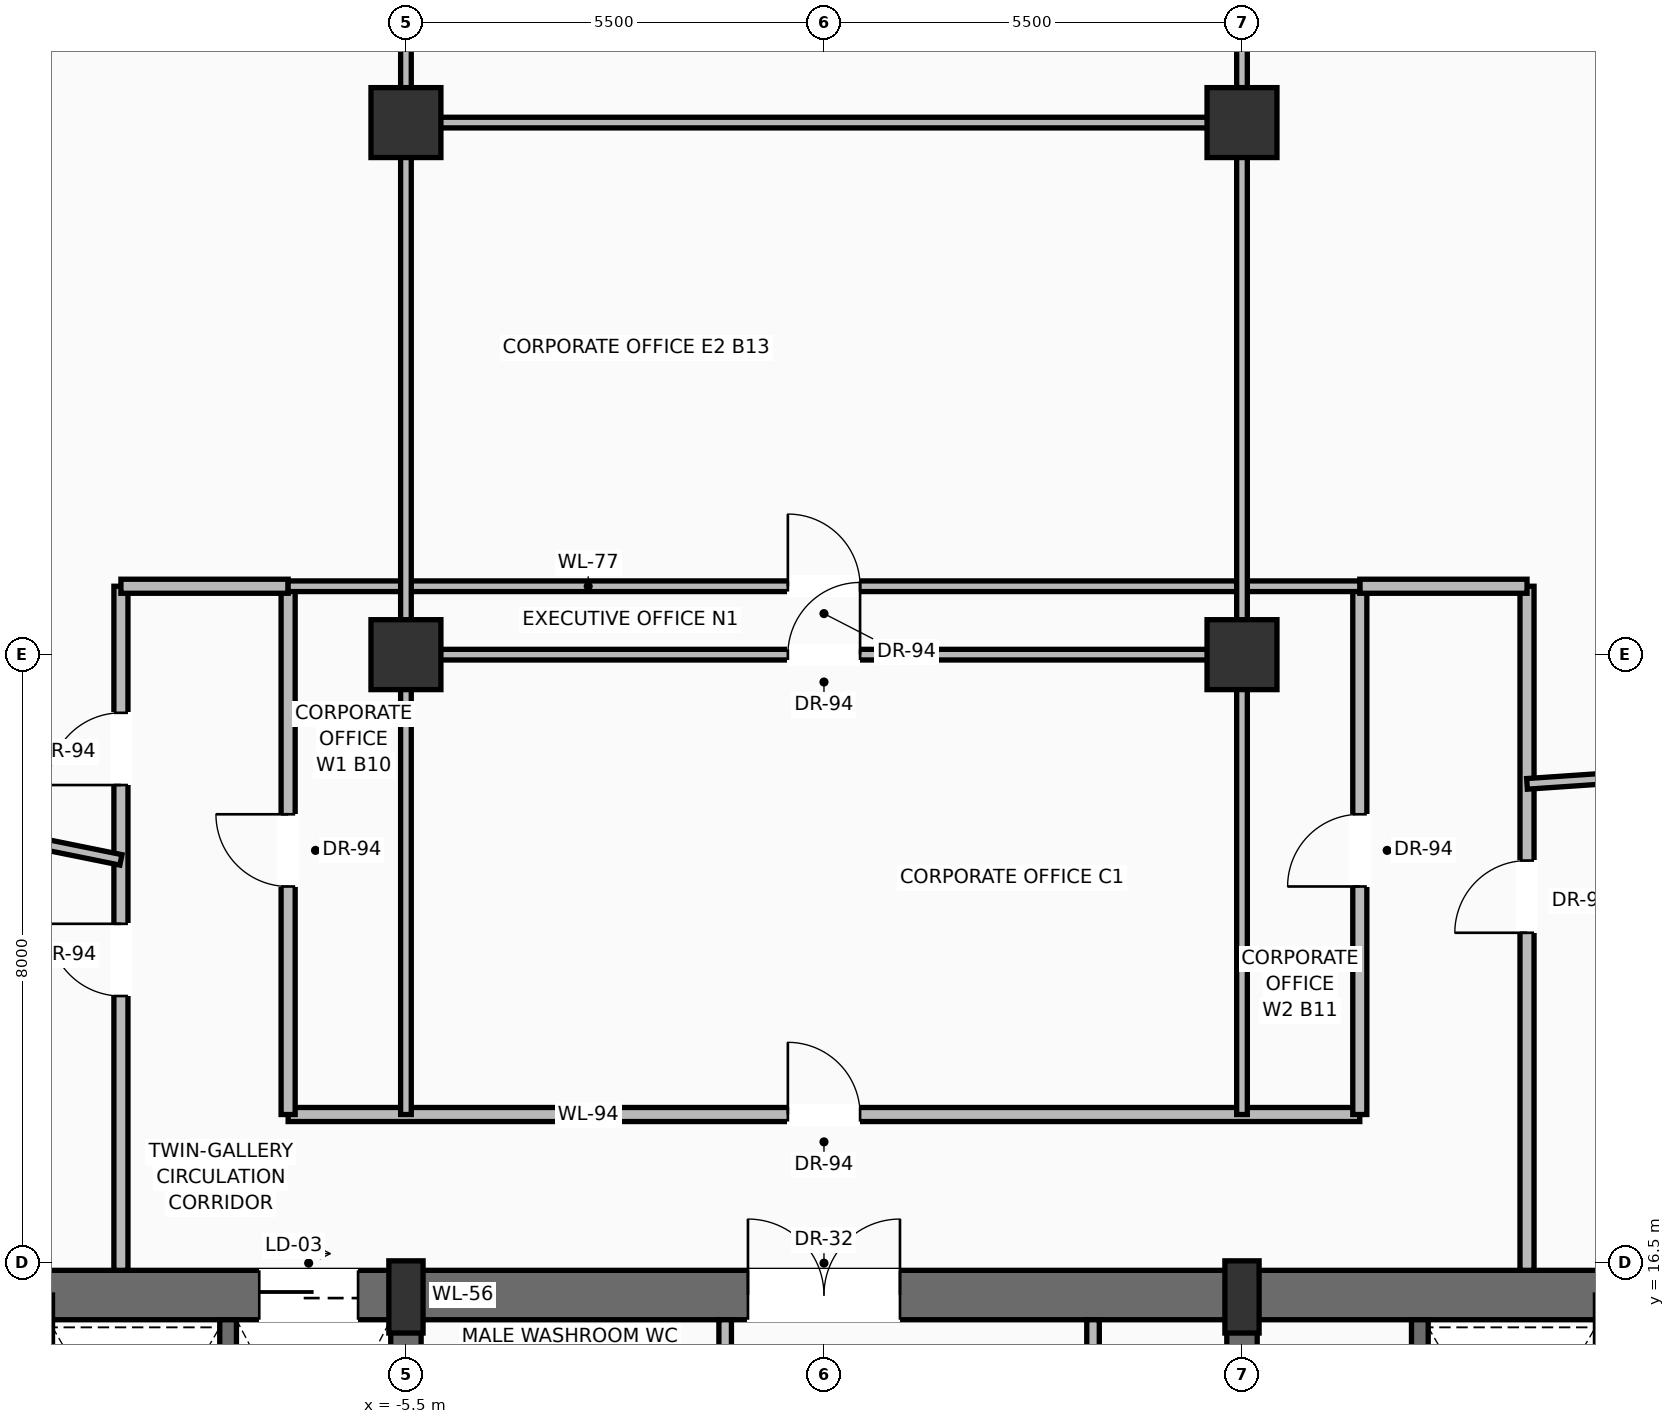
"""IFC4 building model, lengths in metres.
Left out: names, types, materials, properties, quantities, classifications, styles, units other than length and angle.
Written with IfcOpenShell. Run it as: python <this file> out.ifc"""

import sys

from ifc_helpers import new_model, si_unit, direction, frame, frame_2d, origin, origin_2d, place, context, subcontext, project, spatial, rectangle, extrude, source, transform, mapped, element, fill, save


model = new_model("IFC4")
c1 = context("Model", 3, precision=1e-05, world=origin(), true_north=direction((0.0, 1.0)))
c2 = subcontext(c1, "Body", "Model", "MODEL_VIEW")
j1 = project(units=[si_unit("LENGTHUNIT", "METRE"), si_unit("PLANEANGLEUNIT", "RADIAN")], contexts=[c1])
p1 = place(None, origin())
s1 = spatial("IfcSite", under=j1, at=p1, CompositionType="ELEMENT")
p2 = place(p1, origin())
s2 = spatial("IfcBuilding", under=s1, at=p2, CompositionType="ELEMENT")
p3 = place(p2, frame((0.0, 0.0, 133.0)))
s3 = spatial("IfcBuildingStorey", under=s2, at=p3, CompositionType="ELEMENT", Elevation=133.0)
p4 = place(p3, frame((-10.8, 16.075, 0.0), z_axis=(0.0, 0.0, 1.0), x_axis=(1.0, 0.0, 0.0)))
e1 = element("IfcWall", 1, at=p4, inside=s3, PredefinedType="SHEAR", context=c2, shape_type="SweptSolid", body=[
    extrude(rectangle(XDim=21.6, YDim=0.65, at=frame_2d((10.8, 0.0))), origin(), (0.0, 0.0, 1.0), 3.47),
])
p5 = place(p4, frame((3.37, 0.0, 0.0)))
e2 = element("IfcOpeningElement", 2, at=p5, cuts=e1, PredefinedType="OPENING", context=c2, shape_type="SweptSolid", body=[
    extrude(rectangle(XDim=1.3, YDim=2.3, at=frame_2d((0.65, 1.15))), frame((0.0, 0.335, 0.0), z_axis=(0.0, -1.0, 0.0), x_axis=(1.0, 0.0, 0.0)), (0.0, 0.0, 1.0), 0.67),
])
p6 = place(p4, frame((9.8, 0.0, 0.0)))
e3 = element("IfcOpeningElement", 3, at=p6, cuts=e1, PredefinedType="OPENING", context=c2, shape_type="SweptSolid", body=[
    extrude(rectangle(XDim=2.0, YDim=2.4, at=frame_2d((1.0, 1.2))), frame((0.0, 0.335, 0.0), z_axis=(0.0, -1.0, 0.0), x_axis=(1.0, 0.0, 0.0)), (0.0, 0.0, 1.0), 0.67),
])
for number, where, z_axis, x_axis in (
    (4, (-10.475, 0.525, 0.0), (0.0, 0.0, 1.0), (0.0, 1.0, 0.0)),
    (5, (10.475, 0.525, 0.0), (0.0, 0.0, 1.0), (0.0, 1.0, 0.0)),
):
    element("IfcWall", number, at=place(p3, frame(where, z_axis=z_axis, x_axis=x_axis)), inside=s3, PredefinedType="SHEAR", context=c2, shape_type="SweptSolid", body=[
        extrude(rectangle(XDim=15.55, YDim=0.65, at=frame_2d((7.775, 0.0))), origin(), (0.0, 0.0, 1.0), 3.47),
    ])
p7 = place(p3, frame((-5.5, 0.525, 0.0), z_axis=(0.0, 0.0, 1.0), x_axis=(0.0, 1.0, 0.0)))
e6 = element("IfcWall", 6, at=p7, inside=s3, PredefinedType="SHEAR", context=c2, shape_type="SweptSolid", body=[
    extrude(rectangle(XDim=15.55, YDim=0.4, at=frame_2d((7.775, 0.0))), origin(), (0.0, 0.0, 1.0), 3.47),
])
p8 = place(p7, frame((8.975, 0.0, 0.0)))
e7 = element("IfcOpeningElement", 7, at=p8, cuts=e6, PredefinedType="OPENING", context=c2, shape_type="SweptSolid", body=[
    extrude(rectangle(XDim=1.1, YDim=2.2, at=frame_2d((0.55, 1.1))), frame((0.0, 0.21, 0.0), z_axis=(0.0, -1.0, 0.0), x_axis=(1.0, 0.0, 0.0)), (0.0, 0.0, 1.0), 0.42),
])
p9 = place(p3, frame((5.5, 0.525, 0.0), z_axis=(0.0, 0.0, 1.0), x_axis=(0.0, 1.0, 0.0)))
e8 = element("IfcWall", 8, at=p9, inside=s3, PredefinedType="SHEAR", context=c2, shape_type="SweptSolid", body=[
    extrude(rectangle(XDim=15.55, YDim=0.4, at=frame_2d((7.775, 0.0))), origin(), (0.0, 0.0, 1.0), 3.47),
])
p10 = place(p9, frame((8.975, 0.0, 0.0)))
e9 = element("IfcOpeningElement", 9, at=p10, cuts=e8, PredefinedType="OPENING", context=c2, shape_type="SweptSolid", body=[
    extrude(rectangle(XDim=1.1, YDim=2.2, at=frame_2d((0.55, 1.1))), frame((0.0, 0.21, 0.0), z_axis=(0.0, -1.0, 0.0), x_axis=(1.0, 0.0, 0.0)), (0.0, 0.0, 1.0), 0.42),
])
m1 = source(origin(), c2, "Body", "SweptSolid", [
    extrude(rectangle(XDim=0.45, YDim=0.95, at=origin_2d()), origin(), (0.0, 0.0, 1.0), 3.7),
])
for number, where, z_axis, x_axis in (
    (10, (-5.5, 16.05, 0.0), (0.0, 0.0, 1.0), (1.0, 0.0, 0.0)),
    (11, (5.5, 16.05, 0.0), (0.0, 0.0, 1.0), (1.0, 0.0, 0.0)),
):
    element("IfcColumn", number, at=place(p3, frame(where, z_axis=z_axis, x_axis=x_axis)), inside=s3, PredefinedType="PILASTER", context=c2, shape_type="MappedRepresentation", body=[
        mapped(m1, transform((0.0, 0.0, 0.0), scale=1.0)),
    ])
m2 = source(origin(), c2, "Body", "SweptSolid", [
    extrude(rectangle(XDim=0.92, YDim=0.92, at=origin_2d()), origin(), (0.0, 0.0, 1.0), 3.7),
])
for number, where, z_axis, x_axis in (
    (12, (-5.5, 24.5, 0.0), (0.0, 0.0, 1.0), (1.0, 0.0, 0.0)),
    (13, (5.5, 24.5, 0.0), (0.0, 0.0, 1.0), (1.0, 0.0, 0.0)),
    (14, (-5.5, 31.5, 0.0), (0.0, 0.0, 1.0), (1.0, 0.0, 0.0)),
    (15, (5.5, 31.5, 0.0), (0.0, 0.0, 1.0), (1.0, 0.0, 0.0)),
):
    element("IfcColumn", number, at=place(p3, frame(where, z_axis=z_axis, x_axis=x_axis)), inside=s3, PredefinedType="COLUMN", context=c2, shape_type="MappedRepresentation", body=[
        mapped(m2, transform((0.0, 0.0, 0.0), scale=1.0)),
    ])
for number, where, z_axis, x_axis in (
    (16, (-7.84, 11.87, 0.0), (0.0, 0.0, 1.0), (0.0, 1.0, 0.0)),
    (17, (7.84, 11.87, 0.0), (0.0, 0.0, 1.0), (0.0, 1.0, 0.0)),
):
    element("IfcWall", number, at=place(p3, frame(where, z_axis=z_axis, x_axis=x_axis)), inside=s3, PredefinedType="SOLIDWALL", context=c2, shape_type="SweptSolid", body=[
        extrude(rectangle(XDim=3.88, YDim=0.22, at=frame_2d((1.94, 0.0))), origin(), (0.0, 0.0, 1.0), 3.47),
    ])
p11 = place(p3, frame((-1.3, 13.6, 0.0), z_axis=(0.0, 0.0, 1.0), x_axis=(0.0, 1.0, 0.0)))
e18 = element("IfcWall", 18, at=p11, inside=s3, PredefinedType="PARTITIONING", context=c2, shape_type="SweptSolid", body=[
    extrude(rectangle(XDim=2.15, YDim=0.165, at=frame_2d((1.075, 0.0))), origin(), (0.0, 0.0, 1.0), 3.462),
])
p12 = place(p11, frame((0.55, 0.0, 0.0)))
e19 = element("IfcOpeningElement", 19, at=p12, cuts=e18, PredefinedType="OPENING", context=c2, shape_type="SweptSolid", body=[
    extrude(rectangle(XDim=0.9, YDim=2.1, at=frame_2d((0.45, 1.05))), frame((0.0, 0.093, 0.0), z_axis=(0.0, -1.0, 0.0), x_axis=(1.0, 0.0, 0.0)), (0.0, 0.0, 1.0), 0.185),
])
p13 = place(p3, frame((3.54, 11.22, 0.0), z_axis=(0.0, 0.0, 1.0), x_axis=(0.0, 1.0, 0.0)))
e20 = element("IfcWall", 20, at=p13, inside=s3, PredefinedType="PARTITIONING", context=c2, shape_type="SweptSolid", body=[
    extrude(rectangle(XDim=4.53, YDim=0.165, at=frame_2d((2.265, 0.0))), origin(), (0.0, 0.0, 1.0), 3.462),
])
p14 = place(p13, frame((1.25, 0.0, 0.0)))
e21 = element("IfcOpeningElement", 21, at=p14, cuts=e20, PredefinedType="OPENING", context=c2, shape_type="SweptSolid", body=[
    extrude(rectangle(XDim=0.9, YDim=2.1, at=frame_2d((0.45, 1.05))), frame((0.0, 0.093, 0.0), z_axis=(0.0, -1.0, 0.0), x_axis=(1.0, 0.0, 0.0)), (0.0, 0.0, 1.0), 0.185),
])
p15 = place(p3, frame((-7.05, 18.45, 0.0), z_axis=(0.0, 0.0, 1.0), x_axis=(1.0, 0.0, 0.0)))
e22 = element("IfcWall", 22, at=p15, inside=s3, PredefinedType="PARTITIONING", context=c2, shape_type="SweptSolid", body=[
    extrude(rectangle(XDim=14.1, YDim=0.185, at=frame_2d((7.05, 0.0))), origin(), (0.0, 0.0, 1.0), 2.846),
])
p16 = place(p15, frame((6.575, 0.0, 0.0)))
e23 = element("IfcOpeningElement", 23, at=p16, cuts=e22, PredefinedType="OPENING", context=c2, shape_type="SweptSolid", body=[
    extrude(rectangle(XDim=0.95, YDim=2.2, at=frame_2d((0.475, 1.1))), frame((0.0, 0.103, 0.0), z_axis=(0.0, -1.0, 0.0), x_axis=(1.0, 0.0, 0.0)), (0.0, 0.0, 1.0), 0.205),
])
p17 = place(p3, frame((-7.05, 18.45, 0.0), z_axis=(0.0, 0.0, 1.0), x_axis=(0.0, 1.0, 0.0)))
e24 = element("IfcWall", 24, at=p17, inside=s3, PredefinedType="PARTITIONING", context=c2, shape_type="SweptSolid", body=[
    extrude(rectangle(XDim=6.95, YDim=0.185, at=frame_2d((3.475, 0.0))), origin(), (0.0, 0.0, 1.0), 2.846),
])
p18 = place(p17, frame((3.0, 0.0, 0.0)))
e25 = element("IfcOpeningElement", 25, at=p18, cuts=e24, PredefinedType="OPENING", context=c2, shape_type="SweptSolid", body=[
    extrude(rectangle(XDim=0.95, YDim=2.2, at=frame_2d((0.475, 1.1))), frame((0.0, 0.103, 0.0), z_axis=(0.0, -1.0, 0.0), x_axis=(1.0, 0.0, 0.0)), (0.0, 0.0, 1.0), 0.205),
])
p19 = place(p3, frame((7.05, 18.45, 0.0), z_axis=(0.0, 0.0, 1.0), x_axis=(0.0, 1.0, 0.0)))
e26 = element("IfcWall", 26, at=p19, inside=s3, PredefinedType="PARTITIONING", context=c2, shape_type="SweptSolid", body=[
    extrude(rectangle(XDim=6.95, YDim=0.185, at=frame_2d((3.475, 0.0))), origin(), (0.0, 0.0, 1.0), 2.846),
])
p20 = place(p19, frame((3.0, 0.0, 0.0)))
e27 = element("IfcOpeningElement", 27, at=p20, cuts=e26, PredefinedType="OPENING", context=c2, shape_type="SweptSolid", body=[
    extrude(rectangle(XDim=0.95, YDim=2.2, at=frame_2d((0.475, 1.1))), frame((0.0, 0.103, 0.0), z_axis=(0.0, -1.0, 0.0), x_axis=(1.0, 0.0, 0.0)), (0.0, 0.0, 1.0), 0.205),
])
p21 = place(p3, frame((-9.25, 16.4, 0.0), z_axis=(0.0, 0.0, 1.0), x_axis=(0.0, 1.0, 0.0)))
e28 = element("IfcWall", 28, at=p21, inside=s3, PredefinedType="PARTITIONING", context=c2, shape_type="SweptSolid", body=[
    extrude(rectangle(XDim=9.0, YDim=0.185, at=frame_2d((4.5, 0.0))), origin(), (0.0, 0.0, 1.0), 2.846),
])
p22 = place(p21, frame((3.609, 0.0, 0.0)))
e29 = element("IfcOpeningElement", 29, at=p22, cuts=e28, PredefinedType="OPENING", context=c2, shape_type="SweptSolid", body=[
    extrude(rectangle(XDim=0.95, YDim=2.2, at=frame_2d((0.475, 1.1))), frame((0.0, 0.103, 0.0), z_axis=(0.0, -1.0, 0.0), x_axis=(1.0, 0.0, 0.0)), (0.0, 0.0, 1.0), 0.205),
])
p23 = place(p21, frame((6.385, 0.0, 0.0)))
e30 = element("IfcOpeningElement", 30, at=p23, cuts=e28, PredefinedType="OPENING", context=c2, shape_type="SweptSolid", body=[
    extrude(rectangle(XDim=0.95, YDim=2.2, at=frame_2d((0.475, 1.1))), frame((0.0, 0.103, 0.0), z_axis=(0.0, -1.0, 0.0), x_axis=(1.0, 0.0, 0.0)), (0.0, 0.0, 1.0), 0.205),
])
p24 = place(p3, frame((9.25, 16.4, 0.0), z_axis=(0.0, 0.0, 1.0), x_axis=(0.0, 1.0, 0.0)))
e31 = element("IfcWall", 31, at=p24, inside=s3, PredefinedType="PARTITIONING", context=c2, shape_type="SweptSolid", body=[
    extrude(rectangle(XDim=9.0, YDim=0.185, at=frame_2d((4.5, 0.0))), origin(), (0.0, 0.0, 1.0), 2.846),
])
p25 = place(p24, frame((4.441, 0.0, 0.0)))
e32 = element("IfcOpeningElement", 32, at=p25, cuts=e31, PredefinedType="OPENING", context=c2, shape_type="SweptSolid", body=[
    extrude(rectangle(XDim=0.95, YDim=2.2, at=frame_2d((0.475, 1.1))), frame((0.0, 0.103, 0.0), z_axis=(0.0, -1.0, 0.0), x_axis=(1.0, 0.0, 0.0)), (0.0, 0.0, 1.0), 0.205),
])
for number, where, z_axis, x_axis in (
    (33, (-9.25, 25.4, 0.0), (0.0, 0.0, 1.0), (1.0, 0.0, 0.0)),
    (34, (7.05, 25.4, 0.0), (0.0, 0.0, 1.0), (1.0, 0.0, 0.0)),
):
    element("IfcWall", number, at=place(p3, frame(where, z_axis=z_axis, x_axis=x_axis)), inside=s3, PredefinedType="PARTITIONING", context=c2, shape_type="SweptSolid", body=[
        extrude(rectangle(XDim=2.2, YDim=0.185, at=frame_2d((1.1, 0.0))), origin(), (0.0, 0.0, 1.0), 3.462),
    ])
p26 = place(p3, frame((-7.05, 25.4, 0.0), z_axis=(0.0, 0.0, 1.0), x_axis=(1.0, 0.0, 0.0)))
e35 = element("IfcWall", 35, at=p26, inside=s3, PredefinedType="PARTITIONING", context=c2, shape_type="SweptSolid", body=[
    extrude(rectangle(XDim=14.1, YDim=0.14, at=frame_2d((7.05, 0.0))), origin(), (0.0, 0.0, 1.0), 3.462),
])
p27 = place(p26, frame((6.575, 0.0, 0.0)))
e36 = element("IfcOpeningElement", 36, at=p27, cuts=e35, PredefinedType="OPENING", context=c2, shape_type="SweptSolid", body=[
    extrude(rectangle(XDim=0.95, YDim=2.2, at=frame_2d((0.475, 1.1))), frame((0.0, 0.08, 0.0), z_axis=(0.0, -1.0, 0.0), x_axis=(1.0, 0.0, 0.0)), (0.0, 0.0, 1.0), 0.16),
])
for number, where, z_axis, x_axis in (
    (37, (-5.5, 18.45, 0.0), (0.0, 0.0, 1.0), (0.0, 1.0, 0.0)),
    (38, (5.5, 18.45, 0.0), (0.0, 0.0, 1.0), (0.0, 1.0, 0.0)),
):
    element("IfcWall", number, at=place(p3, frame(where, z_axis=z_axis, x_axis=x_axis)), inside=s3, PredefinedType="PARTITIONING", context=c2, shape_type="SweptSolid", body=[
        extrude(rectangle(XDim=14.05, YDim=0.14, at=frame_2d((7.025, 0.0))), origin(), (0.0, 0.0, 1.0), 2.846),
    ])
p28 = place(p3, frame((-5.5, 24.5, 0.0), z_axis=(0.0, 0.0, 1.0), x_axis=(1.0, 0.0, 0.0)))
e39 = element("IfcWall", 39, at=p28, inside=s3, PredefinedType="PARTITIONING", context=c2, shape_type="SweptSolid", body=[
    extrude(rectangle(XDim=11.0, YDim=0.14, at=frame_2d((5.5, 0.0))), origin(), (0.0, 0.0, 1.0), 2.846),
])
p29 = place(p28, frame((5.025, 0.0, 0.0)))
e40 = element("IfcOpeningElement", 40, at=p29, cuts=e39, PredefinedType="OPENING", context=c2, shape_type="SweptSolid", body=[
    extrude(rectangle(XDim=0.95, YDim=2.2, at=frame_2d((0.475, 1.1))), frame((0.0, 0.08, 0.0), z_axis=(0.0, -1.0, 0.0), x_axis=(1.0, 0.0, 0.0)), (0.0, 0.0, 1.0), 0.16),
])
p30 = place(p3, frame((-5.5, 31.5, 0.0), z_axis=(0.0, 0.0, 1.0), x_axis=(1.0, 0.0, 0.0)))
e41 = element("IfcWall", 41, at=p30, inside=s3, PredefinedType="PARTITIONING", context=c2, shape_type="SweptSolid", body=[
    extrude(rectangle(XDim=11.0, YDim=0.14, at=frame_2d((5.5, 0.0))), origin(), (0.0, 0.0, 1.0), 2.846),
])
p31 = place(p3, frame((-17.246, 23.42, 0.0), z_axis=(0.0, 0.0, 1.0), x_axis=(0.980088444261, -0.198561429853, 0.0)))
e42 = element("IfcWall", 42, at=p31, inside=s3, PredefinedType="PARTITIONING", context=c2, shape_type="SweptSolid", body=[
    extrude(rectangle(XDim=8.158, YDim=0.14, at=frame_2d((4.079, 0.0))), origin(), (0.0, 0.0, 1.0), 3.049),
])
p32 = place(p3, frame((9.25, 22.8, 0.0), z_axis=(0.0, 0.0, 1.0), x_axis=(0.997687082157, 0.067974157575, 0.0)))
e43 = element("IfcWall", 43, at=p32, inside=s3, PredefinedType="PARTITIONING", context=c2, shape_type="SweptSolid", body=[
    extrude(rectangle(XDim=8.44, YDim=0.14, at=frame_2d((4.22, 0.0))), origin(), (0.0, 0.0, 1.0), 3.462),
])
m3 = source(origin(), c2, "Body", "SweptSolid", [
    extrude(rectangle(XDim=1.3, YDim=2.3, at=frame_2d((0.65, 1.15))), frame((0.0, 0.025, 0.0), z_axis=(0.0, -1.0, 0.0), x_axis=(1.0, 0.0, 0.0)), (0.0, 0.0, 1.0), 0.05),
])
p33 = place(p5, origin())
e44 = element("IfcDoor", 44, at=p33, inside=s3, OperationType="SLIDING_TO_RIGHT", PredefinedType="DOOR", context=c2, shape_type="MappedRepresentation", body=[
    mapped(m3, transform((0.0, 0.0, 0.0), scale=1.0)),
])
fill(e2, e44)
m4 = source(origin(), c2, "Body", "SweptSolid", [
    extrude(rectangle(XDim=2.0, YDim=2.4, at=frame_2d((1.0, 1.2))), frame((0.0, 0.025, 0.0), z_axis=(0.0, -1.0, 0.0), x_axis=(1.0, 0.0, 0.0)), (0.0, 0.0, 1.0), 0.05),
])
p34 = place(p6, origin())
e45 = element("IfcDoor", 45, at=p34, inside=s3, OperationType="DOUBLE_DOOR_SINGLE_SWING", PredefinedType="DOOR", context=c2, shape_type="MappedRepresentation", body=[
    mapped(m4, transform((0.0, 0.0, 0.0), scale=1.0)),
])
fill(e3, e45)
m5 = source(origin(), c2, "Body", "SweptSolid", [
    extrude(rectangle(XDim=0.95, YDim=2.2, at=frame_2d((0.475, 1.1))), frame((0.0, 0.025, 0.0), z_axis=(0.0, -1.0, 0.0), x_axis=(1.0, 0.0, 0.0)), (0.0, 0.0, 1.0), 0.05),
])
p35 = place(p16, origin())
e46 = element("IfcDoor", 46, at=p35, inside=s3, OperationType="SINGLE_SWING_LEFT", PredefinedType="DOOR", context=c2, shape_type="MappedRepresentation", body=[
    mapped(m5, transform((0.0, 0.0, 0.0), scale=1.0)),
])
fill(e23, e46)
p36 = place(p22, origin())
e47 = element("IfcDoor", 47, at=p36, inside=s3, OperationType="SINGLE_SWING_RIGHT", PredefinedType="DOOR", context=c2, shape_type="MappedRepresentation", body=[
    mapped(m5, transform((0.0, 0.0, 0.0), scale=1.0)),
])
fill(e29, e47)
p37 = place(p25, origin())
e48 = element("IfcDoor", 48, at=p37, inside=s3, OperationType="SINGLE_SWING_LEFT", PredefinedType="DOOR", context=c2, shape_type="MappedRepresentation", body=[
    mapped(m5, transform((0.0, 0.0, 0.0), scale=1.0)),
])
fill(e32, e48)
p38 = place(p18, origin())
e49 = element("IfcDoor", 49, at=p38, inside=s3, OperationType="SINGLE_SWING_RIGHT", PredefinedType="DOOR", context=c2, shape_type="MappedRepresentation", body=[
    mapped(m5, transform((0.0, 0.0, 0.0), scale=1.0)),
])
fill(e25, e49)
p39 = place(p20, origin())
e50 = element("IfcDoor", 50, at=p39, inside=s3, OperationType="SINGLE_SWING_LEFT", PredefinedType="DOOR", context=c2, shape_type="MappedRepresentation", body=[
    mapped(m5, transform((0.0, 0.0, 0.0), scale=1.0)),
])
fill(e27, e50)
p40 = place(p29, origin())
e51 = element("IfcDoor", 51, at=p40, inside=s3, OperationType="SINGLE_SWING_RIGHT", PredefinedType="DOOR", context=c2, shape_type="MappedRepresentation", body=[
    mapped(m5, transform((0.0, 0.0, 0.0), scale=1.0)),
])
fill(e40, e51)
p41 = place(p23, origin())
e52 = element("IfcDoor", 52, at=p41, inside=s3, OperationType="SINGLE_SWING_LEFT", PredefinedType="DOOR", context=c2, shape_type="MappedRepresentation", body=[
    mapped(m5, transform((0.0, 0.0, 0.0), scale=1.0)),
])
fill(e30, e52)
p42 = place(p27, origin())
e53 = element("IfcDoor", 53, at=p42, inside=s3, OperationType="SINGLE_SWING_LEFT", PredefinedType="DOOR", context=c2, shape_type="MappedRepresentation", body=[
    mapped(m5, transform((0.0, 0.0, 0.0), scale=1.0)),
])
fill(e36, e53)
save(model, sys.argv[1])
